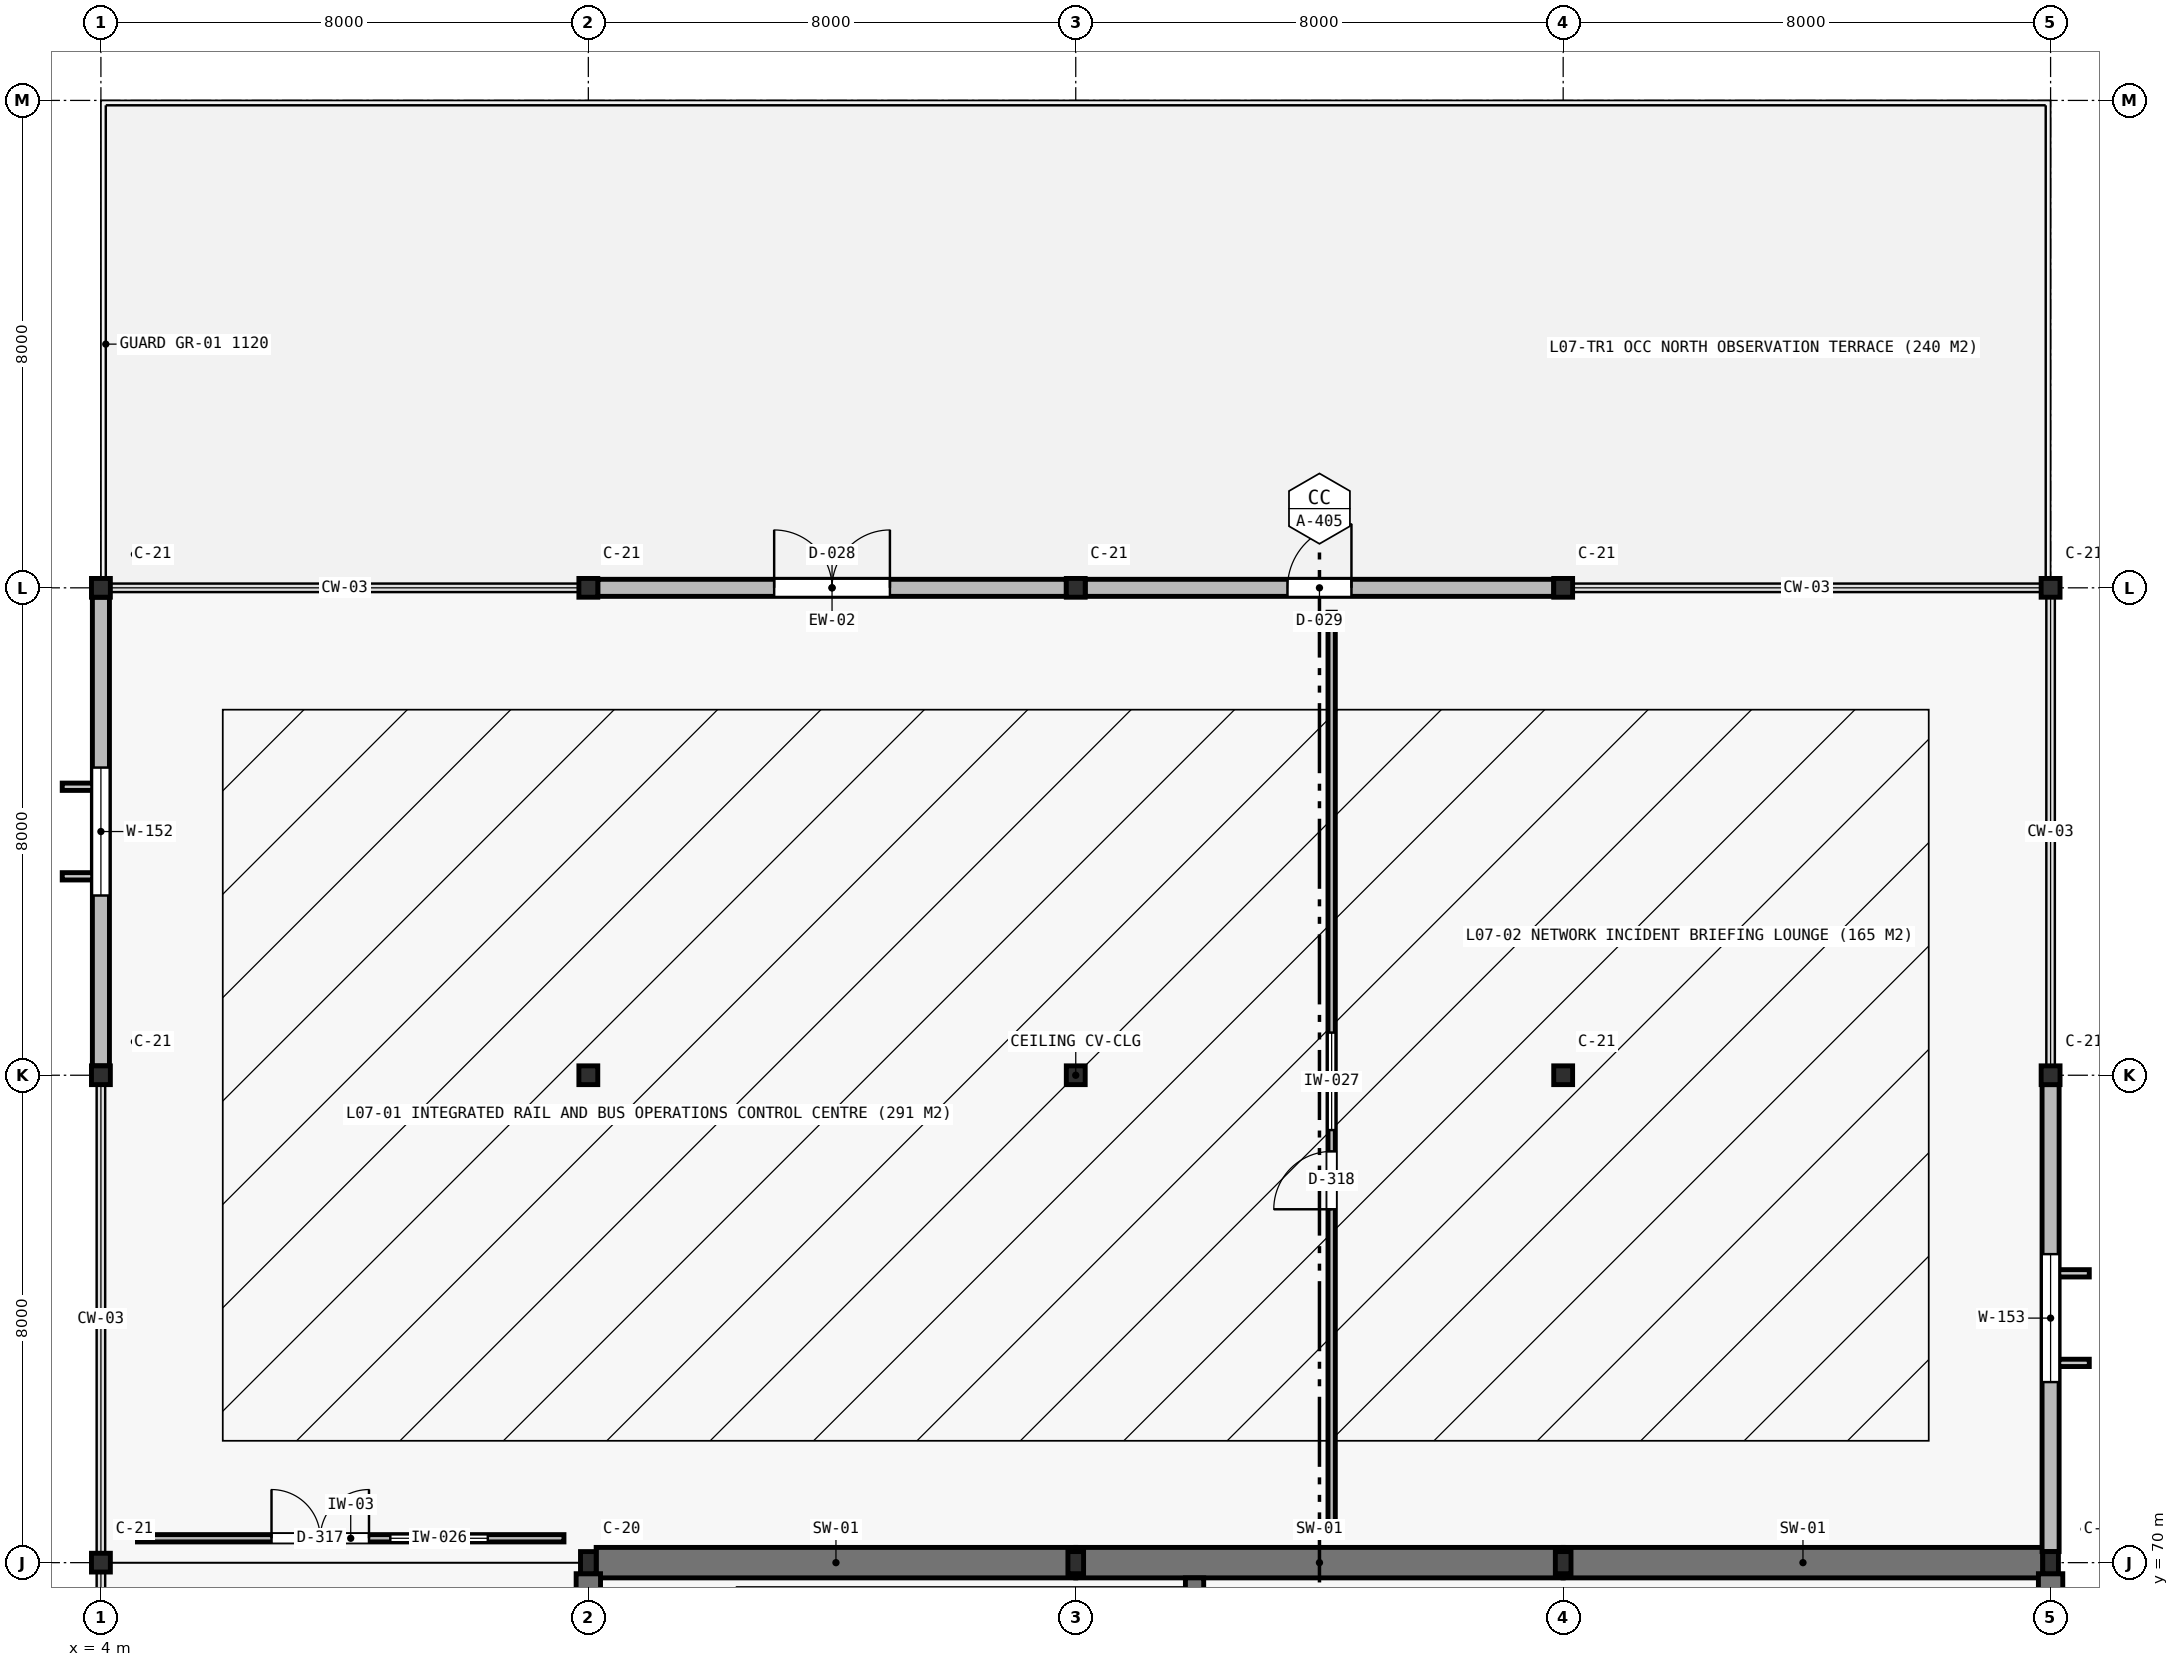
"""IFC4 building model, lengths in metres.
Left out: names, types, materials, properties, quantities, classifications, styles, units other than length and angle.
Written with IfcOpenShell. Run it as: python <this file> out.ifc"""

import sys

from ifc_helpers import new_model, si_unit, direction, frame, frame_2d, origin, origin_2d, place, context, subcontext, project, spatial, rectangle, i_section, extrude, element, fill, save


model = new_model("IFC4")
c1 = context("Model", 3, precision=1e-05, world=origin(), true_north=direction((0.0, 1.0)))
c2 = subcontext(c1, "Body", "Model", "MODEL_VIEW")
j1 = project(units=[si_unit("LENGTHUNIT", "METRE"), si_unit("PLANEANGLEUNIT", "RADIAN")], contexts=[c1])
p1 = place(None, origin())
s1 = spatial("IfcSite", under=j1, at=p1, CompositionType="ELEMENT")
p2 = place(p1, origin())
s2 = spatial("IfcBuilding", under=s1, at=p2, CompositionType="ELEMENT")
p3 = place(p2, frame((0.0, 0.0, 32.2)))
s3 = spatial("IfcBuildingStorey", under=s2, at=p3, CompositionType="ELEMENT", Elevation=32.2)
for number, where, z_axis, x_axis in (
    (1, (4.0, 70.0, 0.0), (0.0, 0.0, 1.0), (1.0, 0.0, 0.0)),
    (2, (4.0, 78.0, 0.0), (0.0, 0.0, 1.0), (1.0, 0.0, 0.0)),
    (3, (4.0, 86.0, 0.0), (0.0, 0.0, 1.0), (1.0, 0.0, 0.0)),
):
    element("IfcColumn", number, at=place(p3, frame(where, z_axis=z_axis, x_axis=x_axis)), inside=s3, PredefinedType="COLUMN", context=c2, shape_type="SweptSolid", body=[
        extrude(i_section(OverallWidth=0.31, OverallDepth=0.308, WebThickness=0.015, FlangeThickness=0.015, at=origin_2d()), origin(), (0.0, 0.0, 1.0), 3.96),
    ])
p4 = place(p3, frame((12.0, 70.0, 0.0), z_axis=(0.0, 0.0, 1.0), x_axis=(1.0, 0.0, 0.0)))
e4 = element("IfcColumn", 4, at=p4, inside=s3, PredefinedType="COLUMN", context=c2, shape_type="SweptSolid", body=[
    extrude(i_section(OverallWidth=0.257, OverallDepth=0.363, WebThickness=0.013, FlangeThickness=0.022, at=origin_2d()), origin(), (0.0, 0.0, 1.0), 3.96),
])
for number, where, z_axis, x_axis in (
    (5, (12.0, 78.0, 0.0), (0.0, 0.0, 1.0), (1.0, 0.0, 0.0)),
    (6, (12.0, 86.0, 0.0), (0.0, 0.0, 1.0), (1.0, 0.0, 0.0)),
):
    element("IfcColumn", number, at=place(p3, frame(where, z_axis=z_axis, x_axis=x_axis)), inside=s3, PredefinedType="COLUMN", context=c2, shape_type="SweptSolid", body=[
        extrude(i_section(OverallWidth=0.31, OverallDepth=0.308, WebThickness=0.015, FlangeThickness=0.015, at=origin_2d()), origin(), (0.0, 0.0, 1.0), 3.96),
    ])
p5 = place(p3, frame((20.0, 70.0, 0.0), z_axis=(0.0, 0.0, 1.0), x_axis=(1.0, 0.0, 0.0)))
e7 = element("IfcColumn", 7, at=p5, inside=s3, PredefinedType="COLUMN", context=c2, shape_type="SweptSolid", body=[
    extrude(i_section(OverallWidth=0.257, OverallDepth=0.363, WebThickness=0.013, FlangeThickness=0.022, at=origin_2d()), origin(), (0.0, 0.0, 1.0), 3.96),
])
for number, where, z_axis, x_axis in (
    (8, (20.0, 78.0, 0.0), (0.0, 0.0, 1.0), (1.0, 0.0, 0.0)),
    (9, (20.0, 86.0, 0.0), (0.0, 0.0, 1.0), (1.0, 0.0, 0.0)),
):
    element("IfcColumn", number, at=place(p3, frame(where, z_axis=z_axis, x_axis=x_axis)), inside=s3, PredefinedType="COLUMN", context=c2, shape_type="SweptSolid", body=[
        extrude(i_section(OverallWidth=0.31, OverallDepth=0.308, WebThickness=0.015, FlangeThickness=0.015, at=origin_2d()), origin(), (0.0, 0.0, 1.0), 3.96),
    ])
p6 = place(p3, frame((28.0, 70.0, 0.0), z_axis=(0.0, 0.0, 1.0), x_axis=(1.0, 0.0, 0.0)))
e10 = element("IfcColumn", 10, at=p6, inside=s3, PredefinedType="COLUMN", context=c2, shape_type="SweptSolid", body=[
    extrude(i_section(OverallWidth=0.257, OverallDepth=0.363, WebThickness=0.013, FlangeThickness=0.022, at=origin_2d()), origin(), (0.0, 0.0, 1.0), 3.96),
])
for number, where, z_axis, x_axis in (
    (11, (28.0, 78.0, 0.0), (0.0, 0.0, 1.0), (1.0, 0.0, 0.0)),
    (12, (28.0, 86.0, 0.0), (0.0, 0.0, 1.0), (1.0, 0.0, 0.0)),
):
    element("IfcColumn", number, at=place(p3, frame(where, z_axis=z_axis, x_axis=x_axis)), inside=s3, PredefinedType="COLUMN", context=c2, shape_type="SweptSolid", body=[
        extrude(i_section(OverallWidth=0.31, OverallDepth=0.308, WebThickness=0.015, FlangeThickness=0.015, at=origin_2d()), origin(), (0.0, 0.0, 1.0), 3.96),
    ])
p7 = place(p3, frame((36.0, 70.0, 0.0), z_axis=(0.0, 0.0, 1.0), x_axis=(1.0, 0.0, 0.0)))
e13 = element("IfcColumn", 13, at=p7, inside=s3, PredefinedType="COLUMN", context=c2, shape_type="SweptSolid", body=[
    extrude(i_section(OverallWidth=0.257, OverallDepth=0.363, WebThickness=0.013, FlangeThickness=0.022, at=origin_2d()), origin(), (0.0, 0.0, 1.0), 3.96),
])
for number, where, z_axis, x_axis in (
    (14, (36.0, 78.0, 0.0), (0.0, 0.0, 1.0), (1.0, 0.0, 0.0)),
    (15, (36.0, 86.0, 0.0), (0.0, 0.0, 1.0), (1.0, 0.0, 0.0)),
):
    element("IfcColumn", number, at=place(p3, frame(where, z_axis=z_axis, x_axis=x_axis)), inside=s3, PredefinedType="COLUMN", context=c2, shape_type="SweptSolid", body=[
        extrude(i_section(OverallWidth=0.31, OverallDepth=0.308, WebThickness=0.015, FlangeThickness=0.015, at=origin_2d()), origin(), (0.0, 0.0, 1.0), 3.96),
    ])
p8 = place(p3, frame((12.128, 70.0, 0.0), z_axis=(0.0, 0.0, 1.0), x_axis=(1.0, 0.0, 0.0)))
e16 = element("IfcWall", 16, at=p8, inside=s3, PredefinedType="SHEAR", context=c2, shape_type="SweptSolid", body=[
    extrude(rectangle(XDim=7.872, YDim=0.5, at=frame_2d((3.936, 0.0))), origin(), (0.0, 0.0, 1.0), 3.96),
])
p9 = place(p3, frame((20.0, 70.0, 0.0), z_axis=(0.0, 0.0, 1.0), x_axis=(1.0, 0.0, 0.0)))
e17 = element("IfcWall", 17, at=p9, inside=s3, PredefinedType="SHEAR", context=c2, shape_type="SweptSolid", body=[
    extrude(rectangle(XDim=8.0, YDim=0.5, at=frame_2d((4.0, 0.0))), origin(), (0.0, 0.0, 1.0), 3.96),
])
p10 = place(p3, frame((28.0, 70.0, 0.0), z_axis=(0.0, 0.0, 1.0), x_axis=(1.0, 0.0, 0.0)))
e18 = element("IfcWall", 18, at=p10, inside=s3, PredefinedType="SHEAR", context=c2, shape_type="SweptSolid", body=[
    extrude(rectangle(XDim=7.872, YDim=0.5, at=frame_2d((3.936, 0.0))), origin(), (0.0, 0.0, 1.0), 3.96),
])
p11 = place(p3, frame((12.0, 62.181, 0.0), z_axis=(0.0, 0.0, 1.0), x_axis=(0.0, 1.0, 0.0)))
e19 = element("IfcWall", 19, at=p11, inside=s3, PredefinedType="SHEAR", context=c2, shape_type="SweptSolid", body=[
    extrude(rectangle(XDim=7.637, YDim=0.4, at=frame_2d((3.819, 0.0))), origin(), (0.0, 0.0, 1.0), 3.96),
])
p12 = place(p11, frame((0.718, 0.0, 0.0)))
e20 = element("IfcOpeningElement", 20, at=p12, cuts=e19, PredefinedType="OPENING", context=c2, shape_type="SweptSolid", body=[
    extrude(rectangle(XDim=1.8, YDim=2.2, at=frame_2d((0.9, 1.1))), frame((0.0, 0.21, 0.0), z_axis=(0.0, -1.0, 0.0), x_axis=(1.0, 0.0, 0.0)), (0.0, 0.0, 1.0), 0.42),
])
p13 = place(p3, frame((36.0, 62.181, 0.0), z_axis=(0.0, 0.0, 1.0), x_axis=(0.0, 1.0, 0.0)))
e21 = element("IfcWall", 21, at=p13, inside=s3, PredefinedType="SHEAR", context=c2, shape_type="SweptSolid", body=[
    extrude(rectangle(XDim=7.637, YDim=0.4, at=frame_2d((3.819, 0.0))), origin(), (0.0, 0.0, 1.0), 3.96),
])
p14 = place(p13, frame((2.1, 0.0, 0.95)))
e22 = element("IfcOpeningElement", 22, at=p14, cuts=e21, PredefinedType="OPENING", context=c2, shape_type="SweptSolid", body=[
    extrude(rectangle(XDim=1.1, YDim=2.3, at=frame_2d((0.55, 1.15))), frame((0.0, 0.21, 0.0), z_axis=(0.0, -1.0, 0.0), x_axis=(1.0, 0.0, 0.0)), (0.0, 0.0, 1.0), 0.42),
])
p15 = place(p3, frame((21.95, 65.7, 0.0), z_axis=(0.0, 0.0, 1.0), x_axis=(0.0, 1.0, 0.0)))
e23 = element("IfcWall", 23, at=p15, inside=s3, PredefinedType="SHEAR", context=c2, shape_type="SweptSolid", body=[
    extrude(rectangle(XDim=4.05, YDim=0.3, at=frame_2d((2.025, 0.0))), origin(), (0.0, 0.0, 1.0), 3.96),
])
p16 = place(p3, frame((4.0, 78.154, 0.0), z_axis=(0.0, 0.0, 1.0), x_axis=(0.0, 1.0, 0.0)))
e24 = element("IfcWall", 24, at=p16, inside=s3, PredefinedType="STANDARD", context=c2, shape_type="SweptSolid", body=[
    extrude(rectangle(XDim=7.692, YDim=0.28, at=frame_2d((3.846, 0.0))), origin(), (0.0, 0.0, 1.0), 3.5),
])
p17 = place(p16, frame((2.796, 0.0, 0.95)))
e25 = element("IfcOpeningElement", 25, at=p17, cuts=e24, PredefinedType="OPENING", context=c2, shape_type="SweptSolid", body=[
    extrude(rectangle(XDim=2.1, YDim=2.1, at=frame_2d((1.05, 1.05))), frame((0.0, 0.15, 0.0), z_axis=(0.0, -1.0, 0.0), x_axis=(1.0, 0.0, 0.0)), (0.0, 0.0, 1.0), 0.3),
])
p18 = place(p3, frame((12.155, 86.0, 0.0), z_axis=(0.0, 0.0, 1.0), x_axis=(1.0, 0.0, 0.0)))
e26 = element("IfcWall", 26, at=p18, inside=s3, PredefinedType="STANDARD", context=c2, shape_type="SweptSolid", body=[
    extrude(rectangle(XDim=7.69, YDim=0.28, at=frame_2d((3.845, 0.0))), origin(), (0.0, 0.0, 1.0), 3.55),
])
p19 = place(p18, frame((2.895, 0.0, 0.0)))
e27 = element("IfcOpeningElement", 27, at=p19, cuts=e26, PredefinedType="OPENING", context=c2, shape_type="SweptSolid", body=[
    extrude(rectangle(XDim=1.9, YDim=2.35, at=frame_2d((0.95, 1.175))), frame((0.0, 0.15, 0.0), z_axis=(0.0, -1.0, 0.0), x_axis=(1.0, 0.0, 0.0)), (0.0, 0.0, 1.0), 0.3),
])
p20 = place(p3, frame((20.155, 86.0, 0.0), z_axis=(0.0, 0.0, 1.0), x_axis=(1.0, 0.0, 0.0)))
e28 = element("IfcWall", 28, at=p20, inside=s3, PredefinedType="STANDARD", context=c2, shape_type="SweptSolid", body=[
    extrude(rectangle(XDim=7.69, YDim=0.28, at=frame_2d((3.845, 0.0))), origin(), (0.0, 0.0, 1.0), 3.55),
])
p21 = place(p20, frame((3.32, 0.0, 0.0)))
e29 = element("IfcOpeningElement", 29, at=p21, cuts=e28, PredefinedType="OPENING", context=c2, shape_type="SweptSolid", body=[
    extrude(rectangle(XDim=1.05, YDim=2.3, at=frame_2d((0.525, 1.15))), frame((0.0, 0.15, 0.0), z_axis=(0.0, -1.0, 0.0), x_axis=(1.0, 0.0, 0.0)), (0.0, 0.0, 1.0), 0.3),
])
p22 = place(p3, frame((36.0, 77.846, 0.0), z_axis=(0.0, 0.0, 1.0), x_axis=(0.0, -1.0, 0.0)))
e30 = element("IfcWall", 30, at=p22, inside=s3, PredefinedType="STANDARD", context=c2, shape_type="SweptSolid", body=[
    extrude(rectangle(XDim=7.665, YDim=0.28, at=frame_2d((3.832, 0.0))), origin(), (0.0, 0.0, 1.0), 3.5),
])
p23 = place(p22, frame((2.782, 0.0, 0.95)))
e31 = element("IfcOpeningElement", 31, at=p23, cuts=e30, PredefinedType="OPENING", context=c2, shape_type="SweptSolid", body=[
    extrude(rectangle(XDim=2.1, YDim=2.1, at=frame_2d((1.05, 1.05))), frame((0.0, 0.15, 0.0), z_axis=(0.0, -1.0, 0.0), x_axis=(1.0, 0.0, 0.0)), (0.0, 0.0, 1.0), 0.3),
])
p24 = place(p3, frame((4.6, 70.4, 0.0), z_axis=(0.0, 0.0, 1.0), x_axis=(1.0, 0.0, 0.0)))
e32 = element("IfcWall", 32, at=p24, inside=s3, PredefinedType="PARTITIONING", context=c2, shape_type="SweptSolid", body=[
    extrude(rectangle(XDim=7.0, YDim=0.12, at=frame_2d((3.5, 0.0))), origin(), (0.0, 0.0, 1.0), 3.96),
])
p25 = place(p24, frame((2.2, 0.0, 0.0)))
e33 = element("IfcOpeningElement", 33, at=p25, cuts=e32, PredefinedType="OPENING", context=c2, shape_type="SweptSolid", body=[
    extrude(rectangle(XDim=1.6, YDim=2.2, at=frame_2d((0.8, 1.1))), frame((0.0, 0.07, 0.0), z_axis=(0.0, -1.0, 0.0), x_axis=(1.0, 0.0, 0.0)), (0.0, 0.0, 1.0), 0.14),
])
p26 = place(p24, frame((4.15, 0.0, 0.95)))
e34 = element("IfcOpeningElement", 34, at=p26, cuts=e32, PredefinedType="OPENING", context=c2, shape_type="SweptSolid", body=[
    extrude(rectangle(XDim=1.6, YDim=1.3, at=frame_2d((0.8, 0.65))), frame((0.0, 0.07, 0.0), z_axis=(0.0, -1.0, 0.0), x_axis=(1.0, 0.0, 0.0)), (0.0, 0.0, 1.0), 0.14),
])
p27 = place(p3, frame((24.2, 70.6, 0.0), z_axis=(0.0, 0.0, 1.0), x_axis=(0.0, 1.0, 0.0)))
e35 = element("IfcWall", 35, at=p27, inside=s3, PredefinedType="PARTITIONING", context=c2, shape_type="SweptSolid", body=[
    extrude(rectangle(XDim=15.0, YDim=0.12, at=frame_2d((7.5, 0.0))), origin(), (0.0, 0.0, 1.0), 3.96),
])
p28 = place(p27, frame((5.2, 0.0, 0.0)))
e36 = element("IfcOpeningElement", 36, at=p28, cuts=e35, PredefinedType="OPENING", context=c2, shape_type="SweptSolid", body=[
    extrude(rectangle(XDim=0.95, YDim=2.1, at=frame_2d((0.475, 1.05))), frame((0.0, 0.07, 0.0), z_axis=(0.0, -1.0, 0.0), x_axis=(1.0, 0.0, 0.0)), (0.0, 0.0, 1.0), 0.14),
])
p29 = place(p27, frame((6.5, 0.0, 0.95)))
e37 = element("IfcOpeningElement", 37, at=p29, cuts=e35, PredefinedType="OPENING", context=c2, shape_type="SweptSolid", body=[
    extrude(rectangle(XDim=1.6, YDim=1.3, at=frame_2d((0.8, 0.65))), frame((0.0, 0.07, 0.0), z_axis=(0.0, -1.0, 0.0), x_axis=(1.0, 0.0, 0.0)), (0.0, 0.0, 1.0), 0.14),
])
p30 = place(p17, origin())
e38 = element("IfcWindow", 38, at=p30, inside=s3, PartitioningType="SINGLE_PANEL", PredefinedType="WINDOW", context=c2, shape_type="SweptSolid", body=[
    extrude(rectangle(XDim=2.1, YDim=2.1, at=frame_2d((1.05, 1.05))), frame((0.0, 0.03, 0.0), z_axis=(0.0, -1.0, 0.0), x_axis=(1.0, 0.0, 0.0)), (0.0, 0.0, 1.0), 0.06),
])
fill(e25, e38)
p31 = place(p19, origin())
e39 = element("IfcDoor", 39, at=p31, inside=s3, OperationType="DOUBLE_DOOR_SINGLE_SWING", PredefinedType="DOOR", context=c2, shape_type="SweptSolid", body=[
    extrude(rectangle(XDim=1.9, YDim=2.35, at=frame_2d((0.95, 1.175))), frame((0.0, 0.025, 0.0), z_axis=(0.0, -1.0, 0.0), x_axis=(1.0, 0.0, 0.0)), (0.0, 0.0, 1.0), 0.05),
])
fill(e27, e39)
p32 = place(p21, origin())
e40 = element("IfcDoor", 40, at=p32, inside=s3, OperationType="SINGLE_SWING_RIGHT", PredefinedType="DOOR", context=c2, shape_type="SweptSolid", body=[
    extrude(rectangle(XDim=1.05, YDim=2.3, at=frame_2d((0.525, 1.15))), frame((0.0, 0.025, 0.0), z_axis=(0.0, -1.0, 0.0), x_axis=(1.0, 0.0, 0.0)), (0.0, 0.0, 1.0), 0.05),
])
fill(e29, e40)
p33 = place(p23, origin())
e41 = element("IfcWindow", 41, at=p33, inside=s3, PartitioningType="SINGLE_PANEL", PredefinedType="WINDOW", context=c2, shape_type="SweptSolid", body=[
    extrude(rectangle(XDim=2.1, YDim=2.1, at=frame_2d((1.05, 1.05))), frame((0.0, 0.03, 0.0), z_axis=(0.0, -1.0, 0.0), x_axis=(1.0, 0.0, 0.0)), (0.0, 0.0, 1.0), 0.06),
])
fill(e31, e41)
p34 = place(p25, origin())
e42 = element("IfcDoor", 42, at=p34, inside=s3, OperationType="DOUBLE_DOOR_SINGLE_SWING", PredefinedType="DOOR", context=c2, shape_type="SweptSolid", body=[
    extrude(rectangle(XDim=1.6, YDim=2.2, at=frame_2d((0.8, 1.1))), frame((0.0, 0.025, 0.0), z_axis=(0.0, -1.0, 0.0), x_axis=(1.0, 0.0, 0.0)), (0.0, 0.0, 1.0), 0.05),
])
fill(e33, e42)
p35 = place(p26, origin())
e43 = element("IfcWindow", 43, at=p35, inside=s3, PartitioningType="SINGLE_PANEL", PredefinedType="WINDOW", context=c2, shape_type="SweptSolid", body=[
    extrude(rectangle(XDim=1.6, YDim=1.3, at=frame_2d((0.8, 0.65))), frame((0.0, 0.03, 0.0), z_axis=(0.0, -1.0, 0.0), x_axis=(1.0, 0.0, 0.0)), (0.0, 0.0, 1.0), 0.06),
])
fill(e34, e43)
p36 = place(p28, origin())
e44 = element("IfcDoor", 44, at=p36, inside=s3, OperationType="SINGLE_SWING_LEFT", PredefinedType="DOOR", context=c2, shape_type="SweptSolid", body=[
    extrude(rectangle(XDim=0.95, YDim=2.1, at=frame_2d((0.475, 1.05))), frame((0.0, 0.025, 0.0), z_axis=(0.0, -1.0, 0.0), x_axis=(1.0, 0.0, 0.0)), (0.0, 0.0, 1.0), 0.05),
])
fill(e36, e44)
p37 = place(p29, origin())
e45 = element("IfcWindow", 45, at=p37, inside=s3, PartitioningType="SINGLE_PANEL", PredefinedType="WINDOW", context=c2, shape_type="SweptSolid", body=[
    extrude(rectangle(XDim=1.6, YDim=1.3, at=frame_2d((0.8, 0.65))), frame((0.0, 0.03, 0.0), z_axis=(0.0, -1.0, 0.0), x_axis=(1.0, 0.0, 0.0)), (0.0, 0.0, 1.0), 0.06),
])
fill(e37, e45)
save(model, sys.argv[1])
